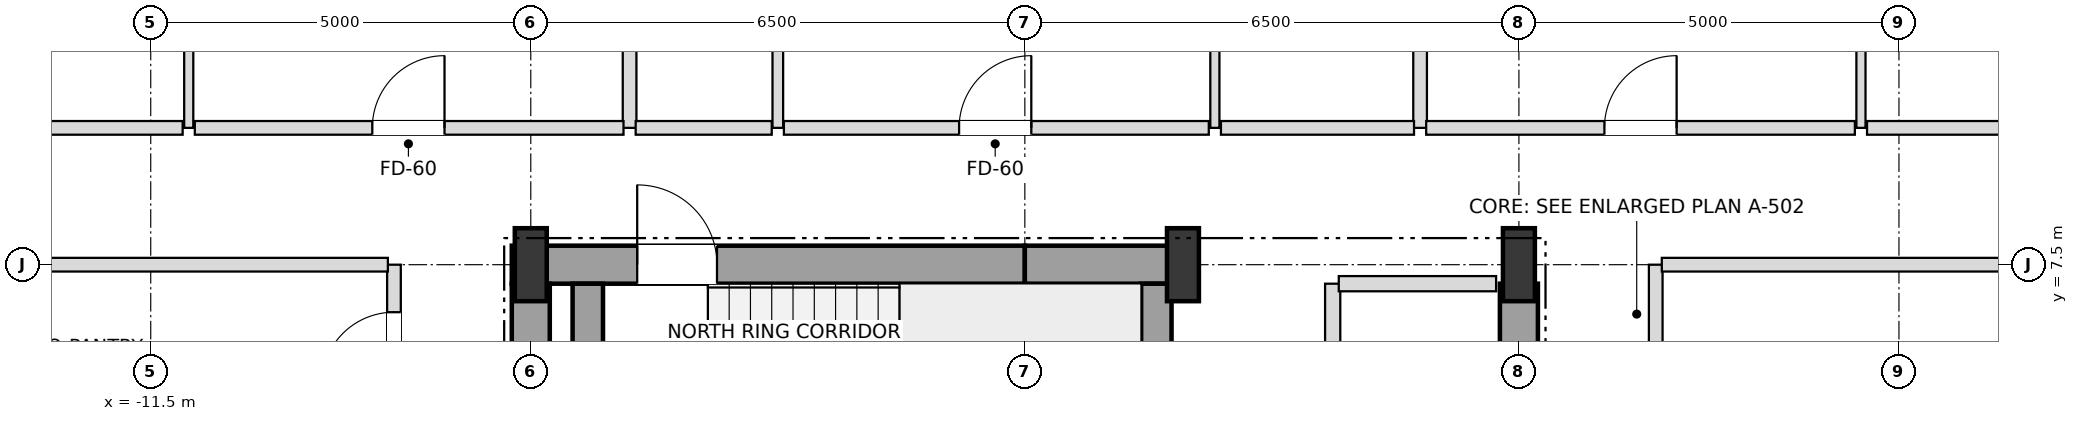
"""IFC4 building model, lengths in metres.
Left out: names, types, materials, properties, quantities, classifications, styles, units other than length and angle.
Written with IfcOpenShell. Run it as: python <this file> out.ifc"""

import sys

from ifc_helpers import new_model, si_unit, direction, frame, frame_2d, origin, origin_2d, place, context, subcontext, project, spatial, rectangle, i_section, extrude, element, fill, save


model = new_model("IFC4")
c1 = context("Model", 3, precision=1e-05, world=origin(), true_north=direction((0.0, 1.0)))
c2 = subcontext(c1, "Body", "Model", "MODEL_VIEW")
j1 = project(units=[si_unit("LENGTHUNIT", "METRE"), si_unit("PLANEANGLEUNIT", "RADIAN")], contexts=[c1])
p1 = place(None, origin())
s1 = spatial("IfcSite", under=j1, at=p1, CompositionType="ELEMENT")
p2 = place(p1, origin())
s2 = spatial("IfcBuilding", under=s1, at=p2, CompositionType="ELEMENT")
p3 = place(p2, frame((0.0, 0.0, 106.2)))
s3 = spatial("IfcBuildingStorey", under=s2, at=p3, CompositionType="ELEMENT", Elevation=106.2)
for number, where, z_axis, x_axis in (
    (1, (-6.5, 7.5, 0.0), (0.0, 0.0, 1.0), (1.0, 0.0, 0.0)),
    (2, (2.08, 7.5, 0.0), (0.0, 0.0, 1.0), (1.0, 0.0, 0.0)),
    (3, (6.5, 7.5, 0.0), (0.0, 0.0, 1.0), (1.0, 0.0, 0.0)),
):
    element("IfcColumn", number, at=place(p3, frame(where, z_axis=z_axis, x_axis=x_axis)), inside=s3, PredefinedType="COLUMN", context=c2, shape_type="SweptSolid", body=[
        extrude(i_section(OverallWidth=0.42, OverallDepth=0.96, WebThickness=0.022, FlangeThickness=0.034, at=origin_2d()), origin(), (0.0, 0.0, 1.0), 3.6),
    ])
p4 = place(p3, frame((-6.75, 7.5, 0.0), z_axis=(0.0, 0.0, 1.0), x_axis=(1.0, 0.0, 0.0)))
e4 = element("IfcWall", 4, at=p4, inside=s3, PredefinedType="SHEAR", context=c2, shape_type="SweptSolid", body=[
    extrude(rectangle(XDim=6.75, YDim=0.5, at=frame_2d((3.375, 0.0))), origin(), (0.0, 0.0, 1.0), 3.38),
])
p5 = place(p4, frame((1.65, 0.0, 0.0)))
e5 = element("IfcOpeningElement", 5, at=p5, cuts=e4, PredefinedType="OPENING", context=c2, shape_type="SweptSolid", body=[
    extrude(rectangle(XDim=1.05, YDim=2.15, at=frame_2d((0.525, 1.075))), frame((0.0, 0.26, 0.0), z_axis=(0.0, -1.0, 0.0), x_axis=(1.0, 0.0, 0.0)), (0.0, 0.0, 1.0), 0.52),
])
p6 = place(p3, frame((0.0, 7.5, 0.0), z_axis=(0.0, 0.0, 1.0), x_axis=(1.0, 0.0, 0.0)))
e6 = element("IfcWall", 6, at=p6, inside=s3, PredefinedType="SHEAR", context=c2, shape_type="SweptSolid", body=[
    extrude(rectangle(XDim=2.08, YDim=0.5, at=frame_2d((1.04, 0.0))), origin(), (0.0, 0.0, 1.0), 3.38),
])
for number, where, z_axis, x_axis in (
    (7, (-6.5, 3.95, 0.0), (0.0, 0.0, 1.0), (0.0, 1.0, 0.0)),
    (8, (6.5, 3.95, 0.0), (0.0, 0.0, 1.0), (0.0, 1.0, 0.0)),
):
    element("IfcWall", number, at=place(p3, frame(where, z_axis=z_axis, x_axis=x_axis)), inside=s3, PredefinedType="SHEAR", context=c2, shape_type="SweptSolid", body=[
        extrude(rectangle(XDim=3.3, YDim=0.5, at=frame_2d((1.65, 0.0))), origin(), (0.0, 0.0, 1.0), 3.38),
    ])
for number, where, z_axis, x_axis in (
    (9, (1.73, 3.95, 0.0), (0.0, 0.0, 1.0), (0.0, 1.0, 0.0)),
    (10, (-5.75, 3.95, 0.0), (0.0, 0.0, 1.0), (0.0, 1.0, 0.0)),
):
    element("IfcWall", number, at=place(p3, frame(where, z_axis=z_axis, x_axis=x_axis)), inside=s3, PredefinedType="SHEAR", context=c2, shape_type="SweptSolid", body=[
        extrude(rectangle(XDim=3.3, YDim=0.4, at=frame_2d((1.65, 0.0))), origin(), (0.0, 0.0, 1.0), 3.38),
    ])
p7 = place(p3, frame((-11.0, 9.3, 0.0), z_axis=(0.0, 0.0, 1.0), x_axis=(0.0, 1.0, 0.0)))
e11 = element("IfcWall", 11, at=p7, inside=s3, PredefinedType="PARTITIONING", context=c2, shape_type="SweptSolid", body=[
    extrude(rectangle(XDim=7.85, YDim=0.12, at=frame_2d((3.925, 0.0))), origin(), (0.0, 0.0, 1.0), 2.816),
])
p8 = place(p7, frame((4.219, 0.0, 0.0)))
e12 = element("IfcOpeningElement", 12, at=p8, cuts=e11, PredefinedType="OPENING", context=c2, shape_type="SweptSolid", body=[
    extrude(rectangle(XDim=0.95, YDim=2.1, at=frame_2d((0.475, 1.05))), frame((0.0, 0.07, 0.0), z_axis=(0.0, -1.0, 0.0), x_axis=(1.0, 0.0, 0.0)), (0.0, 0.0, 1.0), 0.14),
])
p9 = place(p3, frame((-8.3, -7.5, 0.0), z_axis=(0.0, 0.0, 1.0), x_axis=(0.0, 1.0, 0.0)))
e13 = element("IfcWall", 13, at=p9, inside=s3, PredefinedType="PARTITIONING", context=c2, shape_type="SweptSolid", body=[
    extrude(rectangle(XDim=15.0, YDim=0.18, at=frame_2d((7.5, 0.0))), origin(), (0.0, 0.0, 1.0), 3.38),
])
p10 = place(p9, frame((2.075, 0.0, 0.0)))
e14 = element("IfcOpeningElement", 14, at=p10, cuts=e13, PredefinedType="OPENING", context=c2, shape_type="SweptSolid", body=[
    extrude(rectangle(XDim=0.95, YDim=2.15, at=frame_2d((0.475, 1.075))), frame((0.0, 0.1, 0.0), z_axis=(0.0, -1.0, 0.0), x_axis=(1.0, 0.0, 0.0)), (0.0, 0.0, 1.0), 0.2),
])
p11 = place(p9, frame((8.475, 0.0, 0.0)))
e15 = element("IfcOpeningElement", 15, at=p11, cuts=e13, PredefinedType="OPENING", context=c2, shape_type="SweptSolid", body=[
    extrude(rectangle(XDim=0.95, YDim=2.15, at=frame_2d((0.475, 1.075))), frame((0.0, 0.1, 0.0), z_axis=(0.0, -1.0, 0.0), x_axis=(1.0, 0.0, 0.0)), (0.0, 0.0, 1.0), 0.2),
])
p12 = place(p9, frame((13.425, 0.0, 0.0)))
e16 = element("IfcOpeningElement", 16, at=p12, cuts=e13, PredefinedType="OPENING", context=c2, shape_type="SweptSolid", body=[
    extrude(rectangle(XDim=0.95, YDim=2.15, at=frame_2d((0.475, 1.075))), frame((0.0, 0.1, 0.0), z_axis=(0.0, -1.0, 0.0), x_axis=(1.0, 0.0, 0.0)), (0.0, 0.0, 1.0), 0.2),
])
p13 = place(p3, frame((-5.2, 9.3, 0.0), z_axis=(0.0, 0.0, 1.0), x_axis=(0.0, 1.0, 0.0)))
e17 = element("IfcWall", 17, at=p13, inside=s3, PredefinedType="PARTITIONING", context=c2, shape_type="SweptSolid", body=[
    extrude(rectangle(XDim=13.85, YDim=0.18, at=frame_2d((6.925, 0.0))), origin(), (0.0, 0.0, 1.0), 2.816),
])
p14 = place(p3, frame((-3.25, 9.3, 0.0), z_axis=(0.0, 0.0, 1.0), x_axis=(0.0, 1.0, 0.0)))
e18 = element("IfcWall", 18, at=p14, inside=s3, PredefinedType="PARTITIONING", context=c2, shape_type="SweptSolid", body=[
    extrude(rectangle(XDim=7.85, YDim=0.14, at=frame_2d((3.925, 0.0))), origin(), (0.0, 0.0, 1.0), 3.38),
])
p15 = place(p14, frame((3.47, 0.0, 0.0)))
e19 = element("IfcOpeningElement", 19, at=p15, cuts=e18, PredefinedType="OPENING", context=c2, shape_type="SweptSolid", body=[
    extrude(rectangle(XDim=0.9, YDim=2.1, at=frame_2d((0.45, 1.05))), frame((0.0, 0.08, 0.0), z_axis=(0.0, -1.0, 0.0), x_axis=(1.0, 0.0, 0.0)), (0.0, 0.0, 1.0), 0.16),
])
p16 = place(p3, frame((2.5, 9.3, 0.0), z_axis=(0.0, 0.0, 1.0), x_axis=(0.0, 1.0, 0.0)))
e20 = element("IfcWall", 20, at=p16, inside=s3, PredefinedType="PARTITIONING", context=c2, shape_type="SweptSolid", body=[
    extrude(rectangle(XDim=7.85, YDim=0.12, at=frame_2d((3.925, 0.0))), origin(), (0.0, 0.0, 1.0), 3.38),
])
p17 = place(p16, frame((3.445, 0.0, 0.0)))
e21 = element("IfcOpeningElement", 21, at=p17, cuts=e20, PredefinedType="OPENING", context=c2, shape_type="SweptSolid", body=[
    extrude(rectangle(XDim=0.95, YDim=2.1, at=frame_2d((0.475, 1.05))), frame((0.0, 0.07, 0.0), z_axis=(0.0, -1.0, 0.0), x_axis=(1.0, 0.0, 0.0)), (0.0, 0.0, 1.0), 0.14),
])
p18 = place(p3, frame((4.05, 4.2, 0.0), z_axis=(0.0, 0.0, 1.0), x_axis=(0.0, 1.0, 0.0)))
e22 = element("IfcWall", 22, at=p18, inside=s3, PredefinedType="SOLIDWALL", context=c2, shape_type="SweptSolid", body=[
    extrude(rectangle(XDim=3.05, YDim=0.2, at=frame_2d((1.525, 0.0))), origin(), (0.0, 0.0, 1.0), 3.38),
])
p19 = place(p18, frame((0.975, 0.0, 0.0)))
e23 = element("IfcOpeningElement", 23, at=p19, cuts=e22, PredefinedType="OPENING", context=c2, shape_type="SweptSolid", body=[
    extrude(rectangle(XDim=0.95, YDim=2.15, at=frame_2d((0.475, 1.075))), frame((0.0, 0.11, 0.0), z_axis=(0.0, -1.0, 0.0), x_axis=(1.0, 0.0, 0.0)), (0.0, 0.0, 1.0), 0.22),
])
p20 = place(p3, frame((5.2, 9.3, 0.0), z_axis=(0.0, 0.0, 1.0), x_axis=(0.0, 1.0, 0.0)))
e24 = element("IfcWall", 24, at=p20, inside=s3, PredefinedType="PARTITIONING", context=c2, shape_type="SweptSolid", body=[
    extrude(rectangle(XDim=13.85, YDim=0.18, at=frame_2d((6.925, 0.0))), origin(), (0.0, 0.0, 1.0), 2.816),
])
p21 = place(p3, frame((8.3, -7.5, 0.0), z_axis=(0.0, 0.0, 1.0), x_axis=(0.0, 1.0, 0.0)))
e25 = element("IfcWall", 25, at=p21, inside=s3, PredefinedType="PARTITIONING", context=c2, shape_type="SweptSolid", body=[
    extrude(rectangle(XDim=15.0, YDim=0.18, at=frame_2d((7.5, 0.0))), origin(), (0.0, 0.0, 1.0), 3.38),
])
p22 = place(p21, frame((3.475, 0.0, 0.0)))
e26 = element("IfcOpeningElement", 26, at=p22, cuts=e25, PredefinedType="OPENING", context=c2, shape_type="SweptSolid", body=[
    extrude(rectangle(XDim=0.95, YDim=2.15, at=frame_2d((0.475, 1.075))), frame((0.0, 0.1, 0.0), z_axis=(0.0, -1.0, 0.0), x_axis=(1.0, 0.0, 0.0)), (0.0, 0.0, 1.0), 0.2),
])
p23 = place(p3, frame((11.0, 9.3, 0.0), z_axis=(0.0, 0.0, 1.0), x_axis=(0.0, 1.0, 0.0)))
e27 = element("IfcWall", 27, at=p23, inside=s3, PredefinedType="PARTITIONING", context=c2, shape_type="SweptSolid", body=[
    extrude(rectangle(XDim=7.85, YDim=0.12, at=frame_2d((3.925, 0.0))), origin(), (0.0, 0.0, 1.0), 2.816),
])
p24 = place(p23, frame((4.219, 0.0, 0.0)))
e28 = element("IfcOpeningElement", 28, at=p24, cuts=e27, PredefinedType="OPENING", context=c2, shape_type="SweptSolid", body=[
    extrude(rectangle(XDim=0.95, YDim=2.1, at=frame_2d((0.475, 1.05))), frame((0.0, 0.07, 0.0), z_axis=(0.0, -1.0, 0.0), x_axis=(1.0, 0.0, 0.0)), (0.0, 0.0, 1.0), 0.14),
])
p25 = place(p3, frame((4.13, 7.25, 0.0), z_axis=(0.0, 0.0, 1.0), x_axis=(1.0, 0.0, 0.0)))
e29 = element("IfcWall", 29, at=p25, inside=s3, PredefinedType="SOLIDWALL", context=c2, shape_type="SweptSolid", body=[
    extrude(rectangle(XDim=2.07, YDim=0.2, at=frame_2d((1.035, 0.0))), origin(), (0.0, 0.0, 1.0), 3.38),
])
p26 = place(p3, frame((-20.15, 7.5, 0.0), z_axis=(0.0, 0.0, 1.0), x_axis=(1.0, 0.0, 0.0)))
e30 = element("IfcWall", 30, at=p26, inside=s3, PredefinedType="PARTITIONING", context=c2, shape_type="SweptSolid", body=[
    extrude(rectangle(XDim=11.77, YDim=0.18, at=frame_2d((5.885, 0.0))), origin(), (0.0, 0.0, 1.0), 2.816),
])
p27 = place(p3, frame((8.38, 7.5, 0.0), z_axis=(0.0, 0.0, 1.0), x_axis=(1.0, 0.0, 0.0)))
e31 = element("IfcWall", 31, at=p27, inside=s3, PredefinedType="PARTITIONING", context=c2, shape_type="SweptSolid", body=[
    extrude(rectangle(XDim=5.89, YDim=0.18, at=frame_2d((2.945, 0.0))), origin(), (0.0, 0.0, 1.0), 2.816),
])
p28 = place(p3, frame((-13.62, 9.3, 0.0), z_axis=(0.0, 0.0, 1.0), x_axis=(1.0, 0.0, 0.0)))
e32 = element("IfcWall", 32, at=p28, inside=s3, PredefinedType="PARTITIONING", context=c2, shape_type="SweptSolid", body=[
    extrude(rectangle(XDim=2.54, YDim=0.18, at=frame_2d((1.27, 0.0))), origin(), (0.0, 0.0, 1.0), 3.38),
])
p29 = place(p3, frame((-10.92, 9.3, 0.0), z_axis=(0.0, 0.0, 1.0), x_axis=(1.0, 0.0, 0.0)))
e33 = element("IfcWall", 33, at=p29, inside=s3, PredefinedType="PARTITIONING", context=c2, shape_type="SweptSolid", body=[
    extrude(rectangle(XDim=5.64, YDim=0.18, at=frame_2d((2.82, 0.0))), origin(), (0.0, 0.0, 1.0), 2.816),
])
p30 = place(p29, frame((2.335, 0.0, 0.0)))
e34 = element("IfcOpeningElement", 34, at=p30, cuts=e33, PredefinedType="OPENING", context=c2, shape_type="SweptSolid", body=[
    extrude(rectangle(XDim=0.95, YDim=2.15, at=frame_2d((0.475, 1.075))), frame((0.0, 0.1, 0.0), z_axis=(0.0, -1.0, 0.0), x_axis=(1.0, 0.0, 0.0)), (0.0, 0.0, 1.0), 0.2),
])
p31 = place(p3, frame((-5.12, 9.3, 0.0), z_axis=(0.0, 0.0, 1.0), x_axis=(1.0, 0.0, 0.0)))
e35 = element("IfcWall", 35, at=p31, inside=s3, PredefinedType="PARTITIONING", context=c2, shape_type="SweptSolid", body=[
    extrude(rectangle(XDim=1.79, YDim=0.18, at=frame_2d((0.895, 0.0))), origin(), (0.0, 0.0, 1.0), 3.38),
])
p32 = place(p3, frame((-3.17, 9.3, 0.0), z_axis=(0.0, 0.0, 1.0), x_axis=(1.0, 0.0, 0.0)))
e36 = element("IfcWall", 36, at=p32, inside=s3, PredefinedType="PARTITIONING", context=c2, shape_type="SweptSolid", body=[
    extrude(rectangle(XDim=5.59, YDim=0.18, at=frame_2d((2.795, 0.0))), origin(), (0.0, 0.0, 1.0), 3.38),
])
p33 = place(p32, frame((2.305, 0.0, 0.0)))
e37 = element("IfcOpeningElement", 37, at=p33, cuts=e36, PredefinedType="OPENING", context=c2, shape_type="SweptSolid", body=[
    extrude(rectangle(XDim=0.95, YDim=2.15, at=frame_2d((0.475, 1.075))), frame((0.0, 0.1, 0.0), z_axis=(0.0, -1.0, 0.0), x_axis=(1.0, 0.0, 0.0)), (0.0, 0.0, 1.0), 0.2),
])
p34 = place(p3, frame((2.58, 9.3, 0.0), z_axis=(0.0, 0.0, 1.0), x_axis=(1.0, 0.0, 0.0)))
e38 = element("IfcWall", 38, at=p34, inside=s3, PredefinedType="PARTITIONING", context=c2, shape_type="SweptSolid", body=[
    extrude(rectangle(XDim=2.54, YDim=0.18, at=frame_2d((1.27, 0.0))), origin(), (0.0, 0.0, 1.0), 3.38),
])
p35 = place(p3, frame((5.28, 9.3, 0.0), z_axis=(0.0, 0.0, 1.0), x_axis=(1.0, 0.0, 0.0)))
e39 = element("IfcWall", 39, at=p35, inside=s3, PredefinedType="PARTITIONING", context=c2, shape_type="SweptSolid", body=[
    extrude(rectangle(XDim=5.64, YDim=0.18, at=frame_2d((2.82, 0.0))), origin(), (0.0, 0.0, 1.0), 2.816),
])
p36 = place(p35, frame((2.345, 0.0, 0.0)))
e40 = element("IfcOpeningElement", 40, at=p36, cuts=e39, PredefinedType="OPENING", context=c2, shape_type="SweptSolid", body=[
    extrude(rectangle(XDim=0.95, YDim=2.15, at=frame_2d((0.475, 1.075))), frame((0.0, 0.1, 0.0), z_axis=(0.0, -1.0, 0.0), x_axis=(1.0, 0.0, 0.0)), (0.0, 0.0, 1.0), 0.2),
])
p37 = place(p3, frame((11.08, 9.3, 0.0), z_axis=(0.0, 0.0, 1.0), x_axis=(1.0, 0.0, 0.0)))
e41 = element("IfcWall", 41, at=p37, inside=s3, PredefinedType="PARTITIONING", context=c2, shape_type="SweptSolid", body=[
    extrude(rectangle(XDim=2.54, YDim=0.18, at=frame_2d((1.27, 0.0))), origin(), (0.0, 0.0, 1.0), 3.38),
])
p38 = place(p5, origin())
e42 = element("IfcDoor", 42, at=p38, inside=s3, OperationType="SINGLE_SWING_LEFT", PredefinedType="DOOR", context=c2, shape_type="SweptSolid", body=[
    extrude(rectangle(XDim=1.05, YDim=2.15, at=frame_2d((0.525, 1.075))), frame((0.0, 0.025, 0.0), z_axis=(0.0, -1.0, 0.0), x_axis=(1.0, 0.0, 0.0)), (0.0, 0.0, 1.0), 0.05),
])
fill(e5, e42)
p39 = place(p30, origin())
e43 = element("IfcDoor", 43, at=p39, inside=s3, OperationType="SINGLE_SWING_RIGHT", PredefinedType="DOOR", context=c2, shape_type="SweptSolid", body=[
    extrude(rectangle(XDim=0.95, YDim=2.15, at=frame_2d((0.475, 1.075))), frame((0.0, 0.025, 0.0), z_axis=(0.0, -1.0, 0.0), x_axis=(1.0, 0.0, 0.0)), (0.0, 0.0, 1.0), 0.05),
])
fill(e34, e43)
p40 = place(p33, origin())
e44 = element("IfcDoor", 44, at=p40, inside=s3, OperationType="SINGLE_SWING_RIGHT", PredefinedType="DOOR", context=c2, shape_type="SweptSolid", body=[
    extrude(rectangle(XDim=0.95, YDim=2.15, at=frame_2d((0.475, 1.075))), frame((0.0, 0.025, 0.0), z_axis=(0.0, -1.0, 0.0), x_axis=(1.0, 0.0, 0.0)), (0.0, 0.0, 1.0), 0.05),
])
fill(e37, e44)
p41 = place(p36, origin())
e45 = element("IfcDoor", 45, at=p41, inside=s3, OperationType="SINGLE_SWING_RIGHT", PredefinedType="DOOR", context=c2, shape_type="SweptSolid", body=[
    extrude(rectangle(XDim=0.95, YDim=2.15, at=frame_2d((0.475, 1.075))), frame((0.0, 0.025, 0.0), z_axis=(0.0, -1.0, 0.0), x_axis=(1.0, 0.0, 0.0)), (0.0, 0.0, 1.0), 0.05),
])
fill(e40, e45)
p42 = place(p12, origin())
e46 = element("IfcDoor", 46, at=p42, inside=s3, OperationType="SINGLE_SWING_LEFT", PredefinedType="DOOR", context=c2, shape_type="SweptSolid", body=[
    extrude(rectangle(XDim=0.95, YDim=2.15, at=frame_2d((0.475, 1.075))), frame((0.0, 0.025, 0.0), z_axis=(0.0, -1.0, 0.0), x_axis=(1.0, 0.0, 0.0)), (0.0, 0.0, 1.0), 0.05),
])
fill(e16, e46)
save(model, sys.argv[1])
